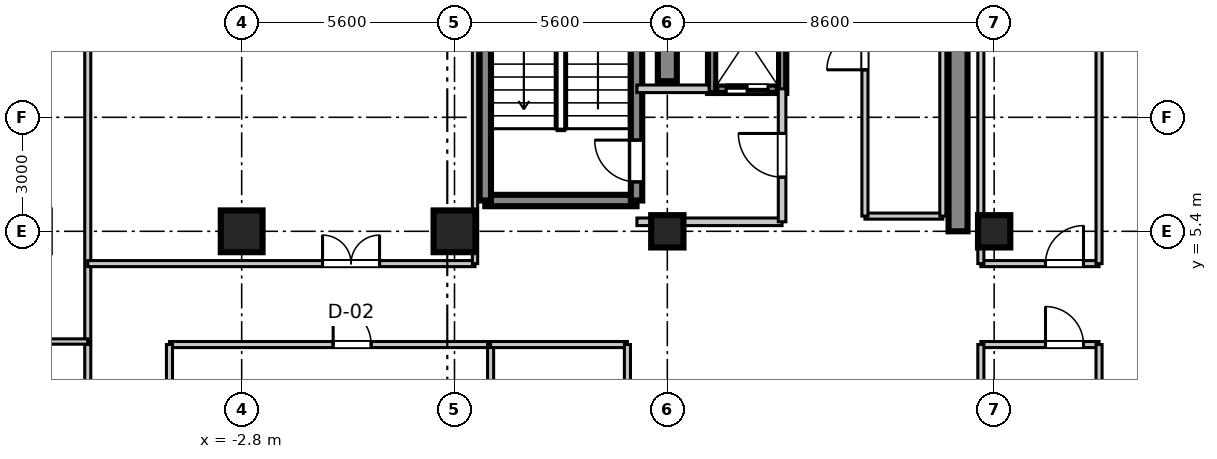
"""IFC4 building model, lengths in metres.
Left out: names, types, materials, properties, quantities, classifications, styles, units other than length and angle.
Written with IfcOpenShell. Run it as: python <this file> out.ifc"""

import sys

from ifc_helpers import new_model, si_unit, direction, frame, frame_2d, origin, origin_2d, place, context, subcontext, project, spatial, rectangle, extrude, source, transform, mapped, element, fill, save


model = new_model("IFC4")
c1 = context("Model", 3, precision=1e-05, world=origin(), true_north=direction((0.0, 1.0)))
c2 = subcontext(c1, "Body", "Model", "MODEL_VIEW")
j1 = project(units=[si_unit("LENGTHUNIT", "METRE"), si_unit("PLANEANGLEUNIT", "RADIAN")], contexts=[c1])
p1 = place(None, origin())
s1 = spatial("IfcSite", under=j1, at=p1, CompositionType="ELEMENT")
p2 = place(p1, origin())
s2 = spatial("IfcBuilding", under=s1, at=p2, CompositionType="ELEMENT")
p3 = place(p2, frame((0.0, 0.0, 192.8)))
s3 = spatial("IfcBuildingStorey", under=s2, at=p3, CompositionType="ELEMENT", Elevation=192.8)
m1 = source(origin(), c2, "Body", "SweptSolid", [
    extrude(rectangle(XDim=1.1, YDim=1.1, at=origin_2d()), origin(), (0.0, 0.0, 1.0), 3.605),
])
for number, where, z_axis, x_axis in (
    (1, (-2.8, 5.4, 0.0), (0.0, 0.0, 1.0), (1.0, 0.0, 0.0)),
    (2, (2.8, 5.4, 0.0), (0.0, 0.0, 1.0), (1.0, 0.0, 0.0)),
):
    element("IfcColumn", number, at=place(p3, frame(where, z_axis=z_axis, x_axis=x_axis)), inside=s3, PredefinedType="COLUMN", context=c2, shape_type="MappedRepresentation", body=[
        mapped(m1, transform((0.0, 0.0, 0.0), scale=1.0)),
    ])
m2 = source(origin(), c2, "Body", "SweptSolid", [
    extrude(rectangle(XDim=0.85, YDim=0.85, at=origin_2d()), origin(), (0.0, 0.0, 1.0), 3.605),
])
for number, where, z_axis, x_axis in (
    (3, (8.4, 5.4, 0.0), (0.0, 0.0, 1.0), (1.0, 0.0, 0.0)),
    (4, (17.0, 5.4, 0.0), (0.0, 0.0, 1.0), (1.0, 0.0, 0.0)),
):
    element("IfcColumn", number, at=place(p3, frame(where, z_axis=z_axis, x_axis=x_axis)), inside=s3, PredefinedType="PILASTER", context=c2, shape_type="MappedRepresentation", body=[
        mapped(m2, transform((0.0, 0.0, 0.0), scale=1.0)),
    ])
m3 = source(origin(), c2, "Body", "SweptSolid", [
    extrude(rectangle(XDim=7.65, YDim=0.5, at=frame_2d((3.825, 0.0))), origin(), (0.0, 0.0, 1.0), 3.39),
])
p4 = place(p3, frame((8.4, 9.35, 0.0), z_axis=(0.0, 0.0, 1.0), x_axis=(0.0, 1.0, 0.0)))
e5 = element("IfcWall", 5, at=p4, inside=s3, PredefinedType="SHEAR", context=c2, shape_type="MappedRepresentation", body=[
    mapped(m3, transform((0.0, 0.0, 0.0), scale=1.0)),
])
m4 = source(origin(), c2, "Body", "SweptSolid", [
    extrude(rectangle(XDim=11.6, YDim=0.5, at=frame_2d((5.8, 0.0))), origin(), (0.0, 0.0, 1.0), 3.39),
])
p5 = place(p3, frame((16.05, 5.4, 0.0), z_axis=(0.0, 0.0, 1.0), x_axis=(0.0, 1.0, 0.0)))
e6 = element("IfcWall", 6, at=p5, inside=s3, PredefinedType="SHEAR", context=c2, shape_type="MappedRepresentation", body=[
    mapped(m4, transform((0.0, 0.0, 0.0), scale=1.0)),
])
m5 = source(origin(), c2, "Body", "SweptSolid", [
    extrude(rectangle(XDim=3.98, YDim=0.3, at=frame_2d((1.99, 0.0))), origin(), (0.0, 0.0, 1.0), 3.39),
])
p6 = place(p3, frame((3.61, 6.21, 0.0), z_axis=(0.0, 0.0, 1.0), x_axis=(1.0, 0.0, 0.0)))
e7 = element("IfcWall", 7, at=p6, inside=s3, PredefinedType="SHEAR", context=c2, shape_type="MappedRepresentation", body=[
    mapped(m5, transform((0.0, 0.0, 0.0), scale=1.0)),
])
m6 = source(origin(), c2, "Body", "SweptSolid", [
    extrude(rectangle(XDim=9.38, YDim=0.3, at=frame_2d((4.69, 0.0))), origin(), (0.0, 0.0, 1.0), 3.39),
])
p7 = place(p3, frame((3.61, 6.21, 0.0), z_axis=(0.0, 0.0, 1.0), x_axis=(0.0, 1.0, 0.0)))
e8 = element("IfcWall", 8, at=p7, inside=s3, PredefinedType="SHEAR", context=c2, shape_type="MappedRepresentation", body=[
    mapped(m6, transform((0.0, 0.0, 0.0), scale=1.0)),
])
p8 = place(p3, frame((7.59, 6.21, 0.0), z_axis=(0.0, 0.0, 1.0), x_axis=(0.0, 1.0, 0.0)))
e9 = element("IfcWall", 9, at=p8, inside=s3, PredefinedType="SHEAR", context=c2, shape_type="MappedRepresentation", body=[
    mapped(m6, transform((0.0, 0.0, 0.0), scale=1.0)),
])
p9 = place(p8, frame((0.49, 0.0, 0.0)))
e10 = element("IfcOpeningElement", 10, at=p9, cuts=e9, PredefinedType="OPENING", context=c2, shape_type="SweptSolid", body=[
    extrude(rectangle(XDim=1.1, YDim=2.15, at=frame_2d((0.55, 1.075))), frame((0.0, 0.16, 0.0), z_axis=(0.0, -1.0, 0.0), x_axis=(1.0, 0.0, 0.0)), (0.0, 0.0, 1.0), 0.32),
])
m7 = source(origin(), c2, "Body", "SweptSolid", [
    extrude(rectangle(XDim=2.82, YDim=0.22, at=frame_2d((1.41, 0.0))), origin(), (0.0, 0.0, 1.0), 3.39),
])
for number, where, z_axis, x_axis in (
    (11, (9.58, 9.04, 0.0), (0.0, 0.0, 1.0), (0.0, 1.0, 0.0)),
    (12, (11.42, 9.04, 0.0), (0.0, 0.0, 1.0), (0.0, 1.0, 0.0)),
):
    element("IfcWall", number, at=place(p3, frame(where, z_axis=z_axis, x_axis=x_axis)), inside=s3, PredefinedType="SHEAR", context=c2, shape_type="MappedRepresentation", body=[
        mapped(m7, transform((0.0, 0.0, 0.0), scale=1.0)),
    ])
m8 = source(origin(), c2, "Body", "SweptSolid", [
    extrude(rectangle(XDim=1.62, YDim=0.22, at=frame_2d((0.81, 0.0))), origin(), (0.0, 0.0, 1.0), 3.39),
])
p10 = place(p3, frame((9.69, 9.15, 0.0), z_axis=(0.0, 0.0, 1.0), x_axis=(1.0, 0.0, 0.0)))
e13 = element("IfcWall", 13, at=p10, inside=s3, PredefinedType="SHEAR", context=c2, shape_type="MappedRepresentation", body=[
    mapped(m8, transform((0.0, 0.0, 0.0), scale=1.0)),
])
p11 = place(p10, frame((0.26, 0.0, 0.0)))
e14 = element("IfcOpeningElement", 14, at=p11, cuts=e13, PredefinedType="OPENING", context=c2, shape_type="SweptSolid", body=[
    extrude(rectangle(XDim=1.1, YDim=2.2, at=frame_2d((0.55, 1.1))), frame((0.0, 0.12, 0.0), z_axis=(0.0, -1.0, 0.0), x_axis=(1.0, 0.0, 0.0)), (0.0, 0.0, 1.0), 0.24),
])
m9 = source(origin(), c2, "Body", "SweptSolid", [
    extrude(rectangle(XDim=3.82, YDim=0.2, at=frame_2d((1.91, 0.0))), origin(), (0.0, 0.0, 1.0), 2.73),
])
p12 = place(p3, frame((7.6, 5.65, 0.0), z_axis=(0.0, 0.0, 1.0), x_axis=(1.0, 0.0, 0.0)))
e15 = element("IfcWall", 15, at=p12, inside=s3, PredefinedType="PARTITIONING", context=c2, shape_type="MappedRepresentation", body=[
    mapped(m9, transform((0.0, 0.0, 0.0), scale=1.0)),
])
m10 = source(origin(), c2, "Body", "SweptSolid", [
    extrude(rectangle(XDim=1.9, YDim=0.2, at=frame_2d((0.95, 0.0))), origin(), (0.0, 0.0, 1.0), 2.73),
])
p13 = place(p3, frame((7.6, 9.15, 0.0), z_axis=(0.0, 0.0, 1.0), x_axis=(1.0, 0.0, 0.0)))
e16 = element("IfcWall", 16, at=p13, inside=s3, PredefinedType="PARTITIONING", context=c2, shape_type="MappedRepresentation", body=[
    mapped(m10, transform((0.0, 0.0, 0.0), scale=1.0)),
])
m11 = source(origin(), c2, "Body", "SweptSolid", [
    extrude(rectangle(XDim=3.5, YDim=0.2, at=frame_2d((1.75, 0.0))), origin(), (0.0, 0.0, 1.0), 2.73),
])
p14 = place(p3, frame((11.42, 5.65, 0.0), z_axis=(0.0, 0.0, 1.0), x_axis=(0.0, 1.0, 0.0)))
e17 = element("IfcWall", 17, at=p14, inside=s3, PredefinedType="PARTITIONING", context=c2, shape_type="MappedRepresentation", body=[
    mapped(m11, transform((0.0, 0.0, 0.0), scale=1.0)),
])
p15 = place(p14, frame((1.175, 0.0, 0.0)))
e18 = element("IfcOpeningElement", 18, at=p15, cuts=e17, PredefinedType="OPENING", context=c2, shape_type="SweptSolid", body=[
    extrude(rectangle(XDim=1.15, YDim=2.15, at=frame_2d((0.575, 1.075))), frame((0.0, 0.11, 0.0), z_axis=(0.0, -1.0, 0.0), x_axis=(1.0, 0.0, 0.0)), (0.0, 0.0, 1.0), 0.22),
])
m12 = source(origin(), c2, "Body", "SweptSolid", [
    extrude(rectangle(XDim=2.05, YDim=0.16, at=frame_2d((1.025, 0.0))), origin(), (0.0, 0.0, 1.0), 2.73),
])
p16 = place(p3, frame((13.6, 5.8, 0.0), z_axis=(0.0, 0.0, 1.0), x_axis=(1.0, 0.0, 0.0)))
e19 = element("IfcWall", 19, at=p16, inside=s3, PredefinedType="PARTITIONING", context=c2, shape_type="MappedRepresentation", body=[
    mapped(m12, transform((0.0, 0.0, 0.0), scale=1.0)),
])
m13 = source(origin(), c2, "Body", "SweptSolid", [
    extrude(rectangle(XDim=8.7, YDim=0.16, at=frame_2d((4.35, 0.0))), origin(), (0.0, 0.0, 1.0), 2.73),
])
p17 = place(p3, frame((13.6, 5.8, 0.0), z_axis=(0.0, 0.0, 1.0), x_axis=(0.0, 1.0, 0.0)))
e20 = element("IfcWall", 20, at=p17, inside=s3, PredefinedType="PARTITIONING", context=c2, shape_type="MappedRepresentation", body=[
    mapped(m13, transform((0.0, 0.0, 0.0), scale=1.0)),
])
p18 = place(p17, frame((3.85, 0.0, 0.0)))
e21 = element("IfcOpeningElement", 21, at=p18, cuts=e20, PredefinedType="OPENING", context=c2, shape_type="SweptSolid", body=[
    extrude(rectangle(XDim=1.0, YDim=2.1, at=frame_2d((0.5, 1.05))), frame((0.0, 0.09, 0.0), z_axis=(0.0, -1.0, 0.0), x_axis=(1.0, 0.0, 0.0)), (0.0, 0.0, 1.0), 0.18),
])
p19 = place(p3, frame((15.65, 5.8, 0.0), z_axis=(0.0, 0.0, 1.0), x_axis=(0.0, 1.0, 0.0)))
e22 = element("IfcWall", 22, at=p19, inside=s3, PredefinedType="PARTITIONING", context=c2, shape_type="MappedRepresentation", body=[
    mapped(m13, transform((0.0, 0.0, 0.0), scale=1.0)),
])
m14 = source(origin(), c2, "Body", "SweptSolid", [
    extrude(rectangle(XDim=3.11, YDim=0.16, at=frame_2d((1.555, 0.0))), origin(), (0.0, 0.0, 1.0), 2.73),
])
p20 = place(p3, frame((16.65, 4.55, 0.0), z_axis=(0.0, 0.0, 1.0), x_axis=(1.0, 0.0, 0.0)))
e23 = element("IfcWall", 23, at=p20, inside=s3, PredefinedType="PARTITIONING", context=c2, shape_type="MappedRepresentation", body=[
    mapped(m14, transform((0.0, 0.0, 0.0), scale=1.0)),
])
p21 = place(p20, frame((1.701, 0.0, 0.0)))
e24 = element("IfcOpeningElement", 24, at=p21, cuts=e23, PredefinedType="OPENING", context=c2, shape_type="SweptSolid", body=[
    extrude(rectangle(XDim=1.0, YDim=2.1, at=frame_2d((0.5, 1.05))), frame((0.0, 0.09, 0.0), z_axis=(0.0, -1.0, 0.0), x_axis=(1.0, 0.0, 0.0)), (0.0, 0.0, 1.0), 0.18),
])
m15 = source(origin(), c2, "Body", "SweptSolid", [
    extrude(rectangle(XDim=17.95, YDim=0.16, at=frame_2d((8.975, 0.0))), origin(), (0.0, 0.0, 1.0), 2.73),
])
p22 = place(p3, frame((16.65, 4.55, 0.0), z_axis=(0.0, 0.0, 1.0), x_axis=(0.0, 1.0, 0.0)))
e25 = element("IfcWall", 25, at=p22, inside=s3, PredefinedType="PARTITIONING", context=c2, shape_type="MappedRepresentation", body=[
    mapped(m15, transform((0.0, 0.0, 0.0), scale=1.0)),
])
m16 = source(origin(), c2, "Body", "SweptSolid", [
    extrude(rectangle(XDim=16.53, YDim=0.16, at=frame_2d((8.265, 0.0))), origin(), (0.0, 0.0, 1.0), 2.73),
])
p23 = place(p3, frame((19.76, 4.55, 0.0), z_axis=(0.0, 0.0, 1.0), x_axis=(0.0, 1.0, 0.0)))
e26 = element("IfcWall", 26, at=p23, inside=s3, PredefinedType="PARTITIONING", context=c2, shape_type="MappedRepresentation", body=[
    mapped(m16, transform((0.0, 0.0, 0.0), scale=1.0)),
])
m17 = source(origin(), c2, "Body", "SweptSolid", [
    extrude(rectangle(XDim=20.0, YDim=0.16, at=frame_2d((10.0, 0.0))), origin(), (0.0, 0.0, 1.0), 2.73),
])
p24 = place(p3, frame((-6.85, 2.5, 0.0), z_axis=(0.0, 0.0, 1.0), x_axis=(0.0, 1.0, 0.0)))
e27 = element("IfcWall", 27, at=p24, inside=s3, PredefinedType="PARTITIONING", context=c2, shape_type="MappedRepresentation", body=[
    mapped(m17, transform((0.0, 0.0, 0.0), scale=1.0)),
])
p25 = place(p24, frame((8.265, 0.0, 0.0)))
e28 = element("IfcOpeningElement", 28, at=p25, cuts=e27, PredefinedType="OPENING", context=c2, shape_type="SweptSolid", body=[
    extrude(rectangle(XDim=0.95, YDim=2.1, at=frame_2d((0.475, 1.05))), frame((0.0, 0.09, 0.0), z_axis=(0.0, -1.0, 0.0), x_axis=(1.0, 0.0, 0.0)), (0.0, 0.0, 1.0), 0.18),
])
m18 = source(origin(), c2, "Body", "SweptSolid", [
    extrude(rectangle(XDim=12.91, YDim=0.14, at=frame_2d((6.455, 0.0))), origin(), (0.0, 0.0, 1.0), 2.73),
])
p26 = place(p3, frame((-19.76, 2.5, 0.0), z_axis=(0.0, 0.0, 1.0), x_axis=(1.0, 0.0, 0.0)))
e29 = element("IfcWall", 29, at=p26, inside=s3, PredefinedType="PARTITIONING", context=c2, shape_type="MappedRepresentation", body=[
    mapped(m18, transform((0.0, 0.0, 0.0), scale=1.0)),
])
m19 = source(origin(), c2, "Body", "SweptSolid", [
    extrude(rectangle(XDim=10.19, YDim=0.16, at=frame_2d((5.095, 0.0))), origin(), (0.0, 0.0, 1.0), 2.73),
])
p27 = place(p3, frame((-6.85, 4.55, 0.0), z_axis=(0.0, 0.0, 1.0), x_axis=(1.0, 0.0, 0.0)))
e30 = element("IfcWall", 30, at=p27, inside=s3, PredefinedType="PARTITIONING", context=c2, shape_type="MappedRepresentation", body=[
    mapped(m19, transform((0.0, 0.0, 0.0), scale=1.0)),
])
p28 = place(p27, frame((6.178, 0.0, 0.0)))
e31 = element("IfcOpeningElement", 31, at=p28, cuts=e30, PredefinedType="OPENING", context=c2, shape_type="SweptSolid", body=[
    extrude(rectangle(XDim=1.5, YDim=2.15, at=frame_2d((0.75, 1.075))), frame((0.0, 0.09, 0.0), z_axis=(0.0, -1.0, 0.0), x_axis=(1.0, 0.0, 0.0)), (0.0, 0.0, 1.0), 0.18),
])
m20 = source(origin(), c2, "Body", "SweptSolid", [
    extrude(rectangle(XDim=17.95, YDim=0.14, at=frame_2d((8.975, 0.0))), origin(), (0.0, 0.0, 1.0), 2.73),
])
p29 = place(p3, frame((3.34, 4.55, 0.0), z_axis=(0.0, 0.0, 1.0), x_axis=(0.0, 1.0, 0.0)))
e32 = element("IfcWall", 32, at=p29, inside=s3, PredefinedType="PARTITIONING", context=c2, shape_type="MappedRepresentation", body=[
    mapped(m20, transform((0.0, 0.0, 0.0), scale=1.0)),
])
m21 = source(origin(), c2, "Body", "SweptSolid", [
    extrude(rectangle(XDim=4.84, YDim=0.16, at=frame_2d((2.42, 0.0))), origin(), (0.0, 0.0, 1.0), 2.73),
])
p30 = place(p3, frame((-6.85, -2.42, 0.0), z_axis=(0.0, 0.0, 1.0), x_axis=(0.0, 1.0, 0.0)))
e33 = element("IfcWall", 33, at=p30, inside=s3, PredefinedType="PARTITIONING", context=c2, shape_type="MappedRepresentation", body=[
    mapped(m21, transform((0.0, 0.0, 0.0), scale=1.0)),
])
p31 = place(p30, frame((1.945, 0.0, 0.0)))
e34 = element("IfcOpeningElement", 34, at=p31, cuts=e33, PredefinedType="OPENING", context=c2, shape_type="SweptSolid", body=[
    extrude(rectangle(XDim=0.95, YDim=2.1, at=frame_2d((0.475, 1.05))), frame((0.0, 0.09, 0.0), z_axis=(0.0, -1.0, 0.0), x_axis=(1.0, 0.0, 0.0)), (0.0, 0.0, 1.0), 0.18),
])
m22 = source(origin(), c2, "Body", "SweptSolid", [
    extrude(rectangle(XDim=8.45, YDim=0.16, at=frame_2d((4.225, 0.0))), origin(), (0.0, 0.0, 1.0), 2.73),
])
p32 = place(p3, frame((-4.7, 2.42, 0.0), z_axis=(0.0, 0.0, 1.0), x_axis=(1.0, 0.0, 0.0)))
e35 = element("IfcWall", 35, at=p32, inside=s3, PredefinedType="PARTITIONING", context=c2, shape_type="MappedRepresentation", body=[
    mapped(m22, transform((0.0, 0.0, 0.0), scale=1.0)),
])
p33 = place(p32, frame((4.307, 0.0, 0.0)))
e36 = element("IfcOpeningElement", 36, at=p33, cuts=e35, PredefinedType="OPENING", context=c2, shape_type="SweptSolid", body=[
    extrude(rectangle(XDim=1.0, YDim=2.1, at=frame_2d((0.5, 1.05))), frame((0.0, 0.09, 0.0), z_axis=(0.0, -1.0, 0.0), x_axis=(1.0, 0.0, 0.0)), (0.0, 0.0, 1.0), 0.18),
])
for number, where, z_axis, x_axis in (
    (37, (-4.7, -2.42, 0.0), (0.0, 0.0, 1.0), (0.0, 1.0, 0.0)),
    (38, (3.75, -2.42, 0.0), (0.0, 0.0, 1.0), (0.0, 1.0, 0.0)),
):
    element("IfcWall", number, at=place(p3, frame(where, z_axis=z_axis, x_axis=x_axis)), inside=s3, PredefinedType="PARTITIONING", context=c2, shape_type="MappedRepresentation", body=[
        mapped(m21, transform((0.0, 0.0, 0.0), scale=1.0)),
    ])
m23 = source(origin(), c2, "Body", "SweptSolid", [
    extrude(rectangle(XDim=3.6, YDim=0.16, at=frame_2d((1.8, 0.0))), origin(), (0.0, 0.0, 1.0), 2.73),
])
p34 = place(p3, frame((3.75, 2.42, 0.0), z_axis=(0.0, 0.0, 1.0), x_axis=(1.0, 0.0, 0.0)))
e39 = element("IfcWall", 39, at=p34, inside=s3, PredefinedType="PARTITIONING", context=c2, shape_type="MappedRepresentation", body=[
    mapped(m23, transform((0.0, 0.0, 0.0), scale=1.0)),
])
p35 = place(p3, frame((7.35, -2.42, 0.0), z_axis=(0.0, 0.0, 1.0), x_axis=(0.0, 1.0, 0.0)))
e40 = element("IfcWall", 40, at=p35, inside=s3, PredefinedType="PARTITIONING", context=c2, shape_type="MappedRepresentation", body=[
    mapped(m21, transform((0.0, 0.0, 0.0), scale=1.0)),
])
p36 = place(p3, frame((16.65, 2.42, 0.0), z_axis=(0.0, 0.0, 1.0), x_axis=(1.0, 0.0, 0.0)))
e41 = element("IfcWall", 41, at=p36, inside=s3, PredefinedType="PARTITIONING", context=c2, shape_type="MappedRepresentation", body=[
    mapped(m14, transform((0.0, 0.0, 0.0), scale=1.0)),
])
p37 = place(p36, frame((1.701, 0.0, 0.0)))
e42 = element("IfcOpeningElement", 42, at=p37, cuts=e41, PredefinedType="OPENING", context=c2, shape_type="SweptSolid", body=[
    extrude(rectangle(XDim=1.0, YDim=2.1, at=frame_2d((0.5, 1.05))), frame((0.0, 0.09, 0.0), z_axis=(0.0, -1.0, 0.0), x_axis=(1.0, 0.0, 0.0)), (0.0, 0.0, 1.0), 0.18),
])
for number, where, z_axis, x_axis in (
    (43, (16.65, -2.42, 0.0), (0.0, 0.0, 1.0), (0.0, 1.0, 0.0)),
    (44, (19.76, -2.42, 0.0), (0.0, 0.0, 1.0), (0.0, 1.0, 0.0)),
):
    element("IfcWall", number, at=place(p3, frame(where, z_axis=z_axis, x_axis=x_axis)), inside=s3, PredefinedType="PARTITIONING", context=c2, shape_type="MappedRepresentation", body=[
        mapped(m21, transform((0.0, 0.0, 0.0), scale=1.0)),
    ])
m24 = source(origin(), c2, "Body", "SweptSolid", [
    extrude(rectangle(XDim=1.1, YDim=2.15, at=frame_2d((0.55, 1.075))), frame((0.0, 0.025, 0.0), z_axis=(0.0, -1.0, 0.0), x_axis=(1.0, 0.0, 0.0)), (0.0, 0.0, 1.0), 0.05),
])
p38 = place(p9, origin())
e45 = element("IfcDoor", 45, at=p38, inside=s3, OperationType="SINGLE_SWING_RIGHT", PredefinedType="DOOR", context=c2, shape_type="MappedRepresentation", body=[
    mapped(m24, transform((0.0, 0.0, 0.0), scale=1.0)),
])
fill(e10, e45)
m25 = source(origin(), c2, "Body", "SweptSolid", [
    extrude(rectangle(XDim=1.1, YDim=2.2, at=frame_2d((0.55, 1.1))), frame((0.0, 0.025, 0.0), z_axis=(0.0, -1.0, 0.0), x_axis=(1.0, 0.0, 0.0)), (0.0, 0.0, 1.0), 0.05),
])
p39 = place(p11, frame((1.1, 0.0, 0.0), z_axis=(0.0, 0.0, 1.0), x_axis=(-1.0, 0.0, 0.0)))
e46 = element("IfcDoor", 46, at=p39, inside=s3, OperationType="DOUBLE_DOOR_SLIDING", PredefinedType="DOOR", context=c2, shape_type="MappedRepresentation", body=[
    mapped(m25, transform((0.0, 0.0, 0.0), scale=1.0)),
])
fill(e14, e46)
m26 = source(origin(), c2, "Body", "SweptSolid", [
    extrude(rectangle(XDim=1.15, YDim=2.15, at=frame_2d((0.575, 1.075))), frame((0.0, 0.025, 0.0), z_axis=(0.0, -1.0, 0.0), x_axis=(1.0, 0.0, 0.0)), (0.0, 0.0, 1.0), 0.05),
])
p40 = place(p15, frame((1.15, 0.0, 0.0), z_axis=(0.0, 0.0, 1.0), x_axis=(-1.0, 0.0, 0.0)))
e47 = element("IfcDoor", 47, at=p40, inside=s3, OperationType="SINGLE_SWING_RIGHT", PredefinedType="DOOR", context=c2, shape_type="MappedRepresentation", body=[
    mapped(m26, transform((0.0, 0.0, 0.0), scale=1.0)),
])
fill(e18, e47)
m27 = source(origin(), c2, "Body", "SweptSolid", [
    extrude(rectangle(XDim=1.0, YDim=2.1, at=frame_2d((0.5, 1.05))), frame((0.0, 0.025, 0.0), z_axis=(0.0, -1.0, 0.0), x_axis=(1.0, 0.0, 0.0)), (0.0, 0.0, 1.0), 0.05),
])
p41 = place(p18, frame((1.0, 0.0, 0.0), z_axis=(0.0, 0.0, 1.0), x_axis=(-1.0, 0.0, 0.0)))
e48 = element("IfcDoor", 48, at=p41, inside=s3, OperationType="SINGLE_SWING_LEFT", PredefinedType="DOOR", context=c2, shape_type="MappedRepresentation", body=[
    mapped(m27, transform((0.0, 0.0, 0.0), scale=1.0)),
])
fill(e21, e48)
p42 = place(p21, origin())
e49 = element("IfcDoor", 49, at=p42, inside=s3, OperationType="SINGLE_SWING_RIGHT", PredefinedType="DOOR", context=c2, shape_type="MappedRepresentation", body=[
    mapped(m27, transform((0.0, 0.0, 0.0), scale=1.0)),
])
fill(e24, e49)
m28 = source(origin(), c2, "Body", "SweptSolid", [
    extrude(rectangle(XDim=1.5, YDim=2.15, at=frame_2d((0.75, 1.075))), frame((0.0, 0.025, 0.0), z_axis=(0.0, -1.0, 0.0), x_axis=(1.0, 0.0, 0.0)), (0.0, 0.0, 1.0), 0.05),
])
p43 = place(p28, origin())
e50 = element("IfcDoor", 50, at=p43, inside=s3, OperationType="DOUBLE_DOOR_SINGLE_SWING", PredefinedType="DOOR", context=c2, shape_type="MappedRepresentation", body=[
    mapped(m28, transform((0.0, 0.0, 0.0), scale=1.0)),
])
fill(e31, e50)
p44 = place(p33, frame((1.0, 0.0, 0.0), z_axis=(0.0, 0.0, 1.0), x_axis=(-1.0, 0.0, 0.0)))
e51 = element("IfcDoor", 51, at=p44, inside=s3, OperationType="SINGLE_SWING_LEFT", PredefinedType="DOOR", context=c2, shape_type="MappedRepresentation", body=[
    mapped(m27, transform((0.0, 0.0, 0.0), scale=1.0)),
])
fill(e36, e51)
p45 = place(p37, frame((1.0, 0.0, 0.0), z_axis=(0.0, 0.0, 1.0), x_axis=(-1.0, 0.0, 0.0)))
e52 = element("IfcDoor", 52, at=p45, inside=s3, OperationType="SINGLE_SWING_LEFT", PredefinedType="DOOR", context=c2, shape_type="MappedRepresentation", body=[
    mapped(m27, transform((0.0, 0.0, 0.0), scale=1.0)),
])
fill(e42, e52)
save(model, sys.argv[1])
